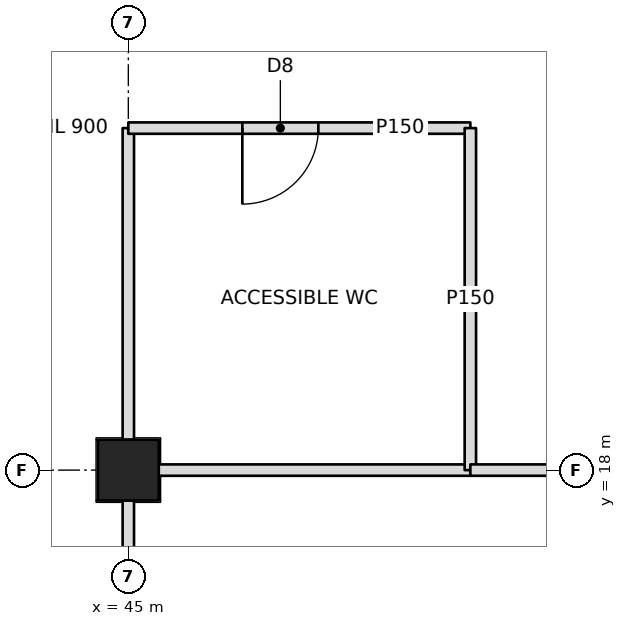
"""IFC4 building model, lengths in metres.
Left out: names, types, materials, properties, quantities, classifications, styles, units other than length and angle.
Written with IfcOpenShell. Run it as: python <this file> out.ifc"""

import sys

from ifc_helpers import new_model, si_unit, direction, frame, frame_2d, origin, origin_2d, place, context, subcontext, project, spatial, rectangle, hollow_rectangle, extrude, element, fill, save


model = new_model("IFC4")
c1 = context("Model", 3, precision=1e-05, world=origin(), true_north=direction((0.0, 1.0)))
c2 = subcontext(c1, "Body", "Model", "MODEL_VIEW")
j1 = project(units=[si_unit("LENGTHUNIT", "METRE"), si_unit("PLANEANGLEUNIT", "RADIAN")], contexts=[c1])
p1 = place(None, origin())
s1 = spatial("IfcSite", under=j1, at=p1, CompositionType="ELEMENT")
p2 = place(p1, origin())
s2 = spatial("IfcBuilding", under=s1, at=p2, CompositionType="ELEMENT")
p3 = place(p2, frame((0.0, 0.0, 6.0)))
s3 = spatial("IfcBuildingStorey", under=s2, at=p3, CompositionType="ELEMENT", Elevation=6.0)
p4 = place(p3, frame((45.0, 18.0, 0.0), z_axis=(0.0, 0.0, 1.0), x_axis=(0.0, 1.0, 0.0)))
e1 = element("IfcColumn", 1, at=p4, inside=s3, PredefinedType="COLUMN", context=c2, shape_type="SweptSolid", body=[
    extrude(hollow_rectangle(XDim=0.8, YDim=0.8, WallThickness=0.1, at=origin_2d()), origin(), (0.0, 0.0, 1.0), 5.0),
])
p5 = place(p3, frame((45.0, 9.4, 0.0), z_axis=(0.0, 0.0, 1.0), x_axis=(0.0, 1.0, 0.0)))
e2 = element("IfcWall", 2, at=p5, inside=s3, PredefinedType="PARTITIONING", context=c2, shape_type="SweptSolid", body=[
    extrude(rectangle(XDim=8.2, YDim=0.15, at=frame_2d((4.1, 0.0))), origin(), (0.0, 0.0, 1.0), 3.892),
])
for number, where, z_axis, x_axis in (
    (3, (45.4, 18.0, 0.0), (0.0, 0.0, 1.0), (1.0, 0.0, 0.0)),
    (4, (45.0, 18.4, 0.0), (0.0, 0.0, 1.0), (0.0, 1.0, 0.0)),
):
    element("IfcWall", number, at=place(p3, frame(where, z_axis=z_axis, x_axis=x_axis)), inside=s3, PredefinedType="PARTITIONING", context=c2, shape_type="SweptSolid", body=[
        extrude(rectangle(XDim=4.1, YDim=0.15, at=frame_2d((2.05, 0.0))), origin(), (0.0, 0.0, 1.0), 3.892),
    ])
p6 = place(p3, frame((45.0, 22.5, 0.0), z_axis=(0.0, 0.0, 1.0), x_axis=(1.0, 0.0, 0.0)))
e5 = element("IfcWall", 5, at=p6, inside=s3, PredefinedType="PARTITIONING", context=c2, shape_type="SweptSolid", body=[
    extrude(rectangle(XDim=4.5, YDim=0.15, at=frame_2d((2.25, 0.0))), origin(), (0.0, 0.0, 1.0), 3.891),
])
p7 = place(p6, frame((1.5, 0.0, 0.0)))
e6 = element("IfcOpeningElement", 6, at=p7, cuts=e5, PredefinedType="OPENING", context=c2, shape_type="SweptSolid", body=[
    extrude(rectangle(XDim=1.0, YDim=2.1, at=frame_2d((0.5, 1.05))), frame((0.0, 0.085, 0.0), z_axis=(0.0, -1.0, 0.0), x_axis=(1.0, 0.0, 0.0)), (0.0, 0.0, 1.0), 0.17),
])
p8 = place(p3, frame((49.5, 22.5, 0.0), z_axis=(0.0, 0.0, 1.0), x_axis=(0.0, -1.0, 0.0)))
e7 = element("IfcWall", 7, at=p8, inside=s3, PredefinedType="PARTITIONING", context=c2, shape_type="SweptSolid", body=[
    extrude(rectangle(XDim=4.5, YDim=0.15, at=frame_2d((2.25, 0.0))), origin(), (0.0, 0.0, 1.0), 3.891),
])
p9 = place(p3, frame((49.5, 18.0, 0.0), z_axis=(0.0, 0.0, 1.0), x_axis=(1.0, 0.0, 0.0)))
e8 = element("IfcWall", 8, at=p9, inside=s3, PredefinedType="PARTITIONING", context=c2, shape_type="SweptSolid", body=[
    extrude(rectangle(XDim=4.1, YDim=0.15, at=frame_2d((2.05, 0.0))), origin(), (0.0, 0.0, 1.0), 3.892),
])
p10 = place(p7, frame((1.0, 0.0, 0.0), z_axis=(0.0, 0.0, 1.0), x_axis=(-1.0, 0.0, 0.0)))
e9 = element("IfcDoor", 9, at=p10, inside=s3, OperationType="SINGLE_SWING_RIGHT", PredefinedType="DOOR", context=c2, shape_type="SweptSolid", body=[
    extrude(rectangle(XDim=1.0, YDim=2.1, at=frame_2d((0.5, 1.05))), frame((0.0, 0.025, 0.0), z_axis=(0.0, -1.0, 0.0), x_axis=(1.0, 0.0, 0.0)), (0.0, 0.0, 1.0), 0.05),
])
fill(e6, e9)
save(model, sys.argv[1])
